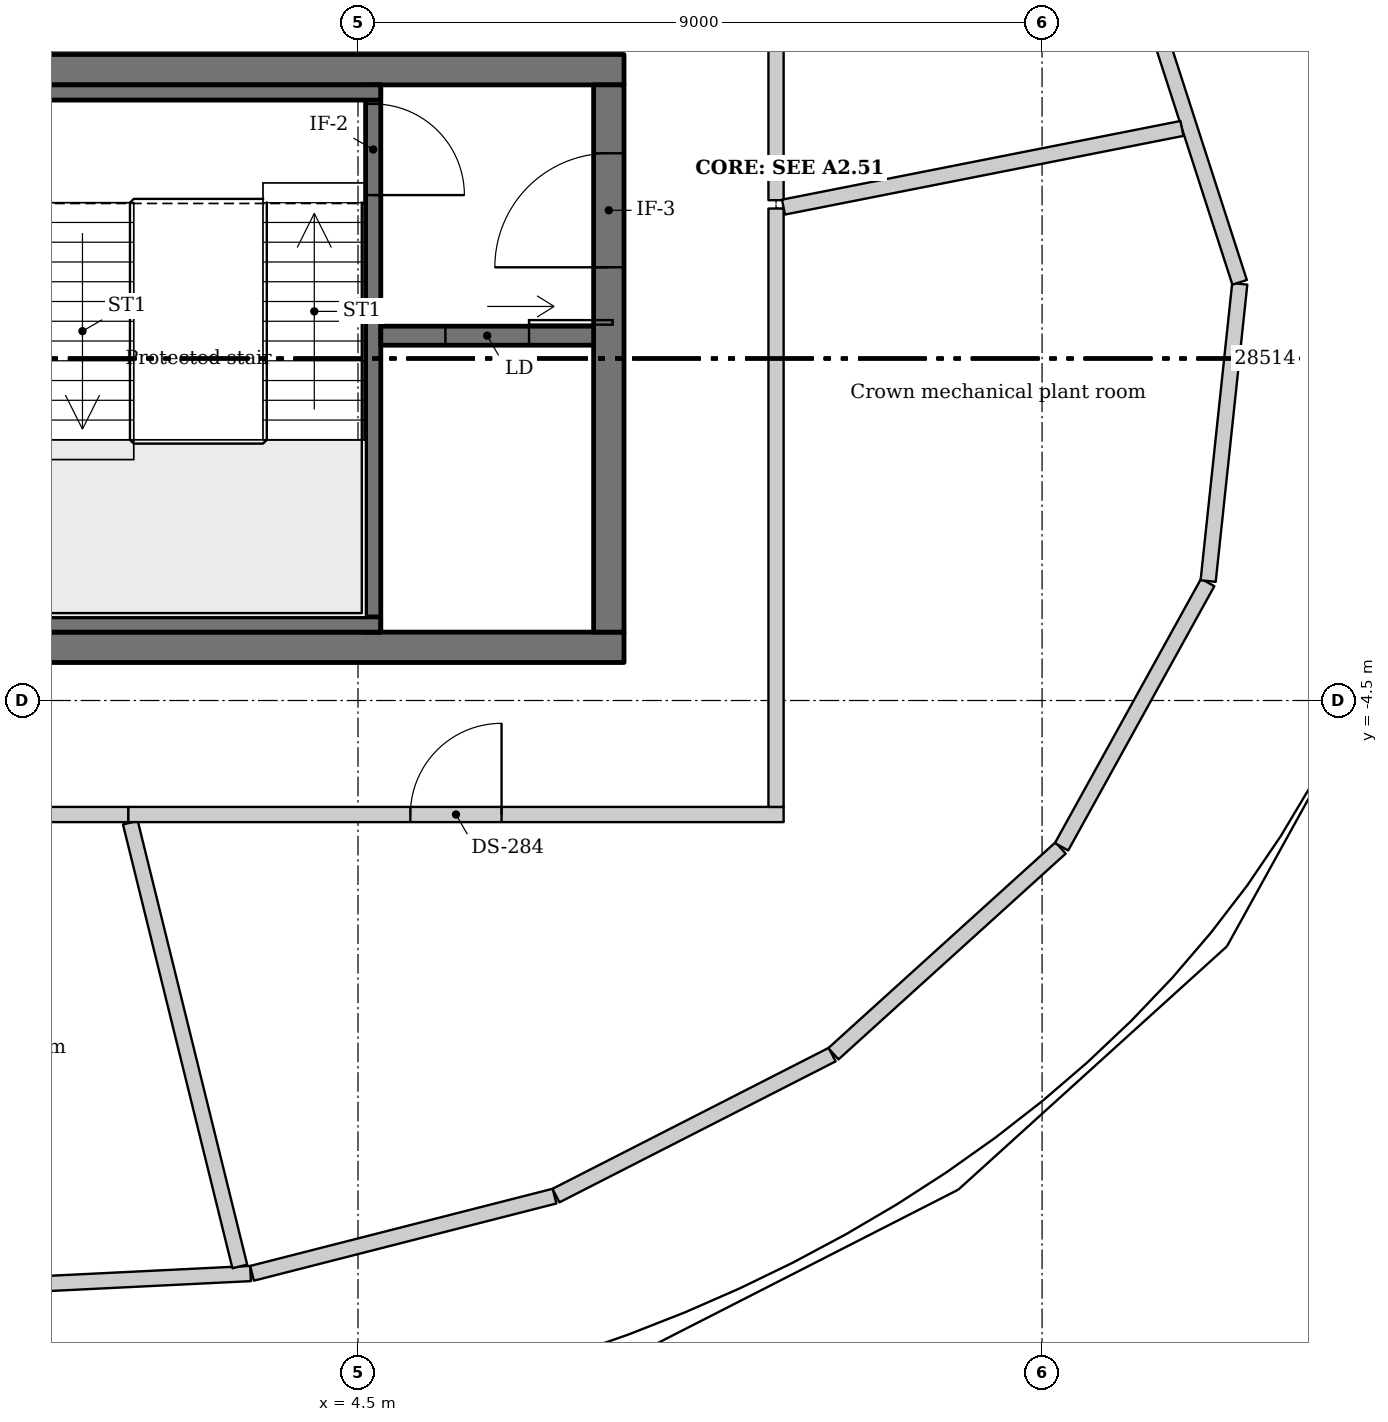
"""IFC4 building model, lengths in metres.
Left out: names, types, materials, properties, quantities, classifications, styles, units other than length and angle.
Written with IfcOpenShell. Run it as: python <this file> out.ifc"""

import sys

from ifc_helpers import new_model, si_unit, direction, frame, frame_2d, origin, place, context, subcontext, project, spatial, rectangle, extrude, source, transform, mapped, element, fill, save


model = new_model("IFC4")
c1 = context("Model", 3, precision=1e-05, world=origin(), true_north=direction((0.0, 1.0)))
c2 = subcontext(c1, "Body", "Model", "MODEL_VIEW")
j1 = project(units=[si_unit("LENGTHUNIT", "METRE"), si_unit("PLANEANGLEUNIT", "RADIAN")], contexts=[c1])
p1 = place(None, origin())
s1 = spatial("IfcSite", under=j1, at=p1, CompositionType="ELEMENT")
p2 = place(p1, origin())
s2 = spatial("IfcBuilding", under=s1, at=p2, CompositionType="ELEMENT")
p3 = place(p2, frame((0.0, 0.0, 356.5)))
s3 = spatial("IfcBuildingStorey", under=s2, at=p3, CompositionType="ELEMENT", Elevation=356.5)
m1 = source(origin(), c2, "Body", "SweptSolid", [
    extrude(rectangle(XDim=16.0, YDim=0.4, at=frame_2d((8.0, 0.0))), origin(), (0.0, 0.0, 1.0), 4.25),
])
for number, where, z_axis, x_axis in (
    (1, (-8.0, 3.8, 0.0), (0.0, 0.0, 1.0), (1.0, 0.0, 0.0)),
    (2, (-8.0, -3.8, 0.0), (0.0, 0.0, 1.0), (1.0, 0.0, 0.0)),
):
    element("IfcWall", number, at=place(p3, frame(where, z_axis=z_axis, x_axis=x_axis)), inside=s3, PredefinedType="SHEAR", context=c2, shape_type="MappedRepresentation", body=[
        mapped(m1, transform((0.0, 0.0, 0.0))),
    ])
m2 = source(origin(), c2, "Body", "SweptSolid", [
    extrude(rectangle(XDim=7.2, YDim=0.4, at=frame_2d((3.6, 0.0))), origin(), (0.0, 0.0, 1.0), 4.25),
])
p4 = place(p3, frame((7.8, -3.6, 0.0), z_axis=(0.0, 0.0, 1.0), x_axis=(0.0, 1.0, 0.0)))
e3 = element("IfcWall", 3, at=p4, inside=s3, PredefinedType="SHEAR", context=c2, shape_type="MappedRepresentation", body=[
    mapped(m2, transform((0.0, 0.0, 0.0))),
])
m3 = source(origin(), c2, "Body", "SweptSolid", [
    extrude(rectangle(XDim=1.5, YDim=2.1, at=frame_2d((0.75, 1.05))), frame((0.0, 0.21, 0.0), z_axis=(0.0, -1.0, 0.0), x_axis=(1.0, 0.0, 0.0)), (0.0, 0.0, 1.0), 0.42),
])
p5 = place(p4, frame((4.8, 0.0, 0.0)))
e4 = element("IfcOpeningElement", 4, at=p5, cuts=e3, PredefinedType="OPENING", context=c2, shape_type="MappedRepresentation", body=[
    mapped(m3, transform((0.0, 0.0, 0.0))),
])
m4 = source(origin(), c2, "Body", "SweptSolid", [
    extrude(rectangle(XDim=4.116, YDim=0.2, at=frame_2d((2.058, 0.0))), origin(), (0.0, 0.0, 1.0), 4.25),
])
p6 = place(p3, frame((3.086, -12.04, 0.0), z_axis=(0.0, 0.0, 1.0), x_axis=(-0.998790641863, -0.049165574616, 0.0)))
e5 = element("IfcWall", 5, at=p6, inside=s3, PredefinedType="SOLIDWALL", context=c2, shape_type="MappedRepresentation", body=[
    mapped(m4, transform((0.0, 0.0, 0.0))),
])
m5 = source(origin(), c2, "Body", "SweptSolid", [
    extrude(rectangle(XDim=4.107, YDim=0.2, at=frame_2d((2.054, 0.0))), origin(), (0.0, 0.0, 1.0), 4.25),
])
p7 = place(p3, frame((7.086, -11.021, 0.0), z_axis=(0.0, 0.0, 1.0), x_axis=(-0.96894922759, -0.247259770996, 0.0)))
e6 = element("IfcWall", 6, at=p7, inside=s3, PredefinedType="SOLIDWALL", context=c2, shape_type="MappedRepresentation", body=[
    mapped(m5, transform((0.0, 0.0, 0.0))),
])
m6 = source(origin(), c2, "Body", "SweptSolid", [
    extrude(rectangle(XDim=4.08, YDim=0.2, at=frame_2d((2.04, 0.0))), origin(), (0.0, 0.0, 1.0), 4.25),
])
p8 = place(p3, frame((10.738, -9.159, 0.0), z_axis=(0.0, 0.0, 1.0), x_axis=(-0.89066198265, -0.454666067198, 0.0)))
e7 = element("IfcWall", 7, at=p8, inside=s3, PredefinedType="SOLIDWALL", context=c2, shape_type="MappedRepresentation", body=[
    mapped(m6, transform((0.0, 0.0, 0.0))),
])
m7 = source(origin(), c2, "Body", "SweptSolid", [
    extrude(rectangle(XDim=4.033, YDim=0.2, at=frame_2d((2.017, 0.0))), origin(), (0.0, 0.0, 1.0), 4.25),
])
p9 = place(p3, frame((13.744, -6.44, 0.0), z_axis=(0.0, 0.0, 1.0), x_axis=(-0.741168574023, -0.671318959125, 0.0)))
e8 = element("IfcWall", 8, at=p9, inside=s3, PredefinedType="SOLIDWALL", context=c2, shape_type="MappedRepresentation", body=[
    mapped(m7, transform((0.0, 0.0, 0.0))),
])
m8 = source(origin(), c2, "Body", "SweptSolid", [
    extrude(rectangle(XDim=3.974, YDim=0.2, at=frame_2d((1.987, 0.0))), origin(), (0.0, 0.0, 1.0), 4.25),
])
p10 = place(p3, frame((15.679, -2.947, 0.0), z_axis=(0.0, 0.0, 1.0), x_axis=(-0.483910254113, -0.875117629787, 0.0)))
e9 = element("IfcWall", 9, at=p10, inside=s3, PredefinedType="SOLIDWALL", context=c2, shape_type="MappedRepresentation", body=[
    mapped(m8, transform((0.0, 0.0, 0.0))),
])
m9 = source(origin(), c2, "Body", "SweptSolid", [
    extrude(rectangle(XDim=3.933, YDim=0.2, at=frame_2d((1.966, 0.0))), origin(), (0.0, 0.0, 1.0), 4.25),
])
p11 = place(p3, frame((16.101, 0.983, 0.0), z_axis=(0.0, 0.0, 1.0), x_axis=(-0.10577691274, -0.994389885674, 0.0)))
e10 = element("IfcWall", 10, at=p11, inside=s3, PredefinedType="SOLIDWALL", context=c2, shape_type="MappedRepresentation", body=[
    mapped(m9, transform((0.0, 0.0, 0.0))),
])
m10 = source(origin(), c2, "Body", "SweptSolid", [
    extrude(rectangle(XDim=3.948, YDim=0.2, at=frame_2d((1.974, 0.0))), origin(), (0.0, 0.0, 1.0), 4.25),
])
p12 = place(p3, frame((14.885, 4.76, 0.0), z_axis=(0.0, 0.0, 1.0), x_axis=(0.307365880997, -0.951591411898, 0.0)))
e11 = element("IfcWall", 11, at=p12, inside=s3, PredefinedType="SOLIDWALL", context=c2, shape_type="MappedRepresentation", body=[
    mapped(m10, transform((0.0, 0.0, 0.0))),
])
m11 = source(origin(), c2, "Body", "SweptSolid", [
    extrude(rectangle(XDim=7.2, YDim=0.2, at=frame_2d((3.6, 0.0))), origin(), (0.0, 0.0, 1.0), 4.25),
])
p13 = place(p3, frame((4.7, -3.6, 0.0), z_axis=(0.0, 0.0, 1.0), x_axis=(0.0, 1.0, 0.0)))
e12 = element("IfcWall", 12, at=p13, inside=s3, PredefinedType="SHEAR", context=c2, shape_type="MappedRepresentation", body=[
    mapped(m11, transform((0.0, 0.0, 0.0))),
])
m12 = source(origin(), c2, "Body", "SweptSolid", [
    extrude(rectangle(XDim=1.2, YDim=2.1, at=frame_2d((0.6, 1.05))), frame((0.0, 0.11, 0.0), z_axis=(0.0, -1.0, 0.0), x_axis=(1.0, 0.0, 0.0)), (0.0, 0.0, 1.0), 0.22),
])
p14 = place(p13, frame((5.75, 0.0, 0.0)))
e13 = element("IfcOpeningElement", 13, at=p14, cuts=e12, PredefinedType="OPENING", context=c2, shape_type="MappedRepresentation", body=[
    mapped(m12, transform((0.0, 0.0, 0.0))),
])
m13 = source(origin(), c2, "Body", "SweptSolid", [
    extrude(rectangle(XDim=2.8, YDim=0.25, at=frame_2d((1.4, 0.0))), origin(), (0.0, 0.0, 1.0), 4.25),
])
p15 = place(p3, frame((7.6, 0.3, 0.0), z_axis=(0.0, 0.0, 1.0), x_axis=(-1.0, 0.0, 0.0)))
e14 = element("IfcWall", 14, at=p15, inside=s3, PredefinedType="SHEAR", context=c2, shape_type="MappedRepresentation", body=[
    mapped(m13, transform((0.0, 0.0, 0.0))),
])
m14 = source(origin(), c2, "Body", "SweptSolid", [
    extrude(rectangle(XDim=1.1, YDim=2.1, at=frame_2d((0.55, 1.05))), frame((0.0, 0.135, 0.0), z_axis=(0.0, -1.0, 0.0), x_axis=(1.0, 0.0, 0.0)), (0.0, 0.0, 1.0), 0.27),
])
p16 = place(p15, frame((0.85, 0.0, 0.0)))
e15 = element("IfcOpeningElement", 15, at=p16, cuts=e14, PredefinedType="OPENING", context=c2, shape_type="MappedRepresentation", body=[
    mapped(m14, transform((0.0, 0.0, 0.0))),
])
m15 = source(origin(), c2, "Body", "SweptSolid", [
    extrude(rectangle(XDim=9.596, YDim=0.2, at=frame_2d((4.798, 0.0))), origin(), (0.0, 0.0, 1.0), 4.25),
])
for number, where, z_axis, x_axis in (
    (16, (-4.798, -3.5, 0.0), (0.0, 0.0, 1.0), (1.0, 0.0, 0.0)),
    (17, (4.798, 3.5, 0.0), (0.0, 0.0, 1.0), (-1.0, 0.0, 0.0)),
):
    element("IfcWall", number, at=place(p3, frame(where, z_axis=z_axis, x_axis=x_axis)), inside=s3, PredefinedType="SHEAR", context=c2, shape_type="MappedRepresentation", body=[
        mapped(m15, transform((0.0, 0.0, 0.0))),
    ])
m16 = source(origin(), c2, "Body", "SweptSolid", [
    extrude(rectangle(XDim=11.579, YDim=0.2, at=frame_2d((5.79, 0.0))), origin(), (0.0, 0.0, 1.0), 4.25),
])
p17 = place(p3, frame((1.479, -6.0, 0.0), z_axis=(0.0, 0.0, 1.0), x_axis=(-1.0, 0.0, 0.0)))
e18 = element("IfcWall", 18, at=p17, inside=s3, PredefinedType="PARTITIONING", context=c2, shape_type="MappedRepresentation", body=[
    mapped(m16, transform((0.0, 0.0, 0.0))),
])
p18 = place(p17, frame((5.189, 0.0, 0.0)))
e19 = element("IfcOpeningElement", 19, at=p18, cuts=e18, PredefinedType="OPENING", context=c2, shape_type="MappedRepresentation", body=[
    mapped(m12, transform((0.0, 0.0, 0.0))),
])
m17 = source(origin(), c2, "Body", "SweptSolid", [
    extrude(rectangle(XDim=6.014, YDim=0.2, at=frame_2d((3.007, 0.0))), origin(), (0.0, 0.0, 1.0), 4.25),
])
p19 = place(p3, frame((1.505, -6.107, 0.0), z_axis=(0.0, 0.0, 1.0), x_axis=(0.239468317603, -0.970904179033, 0.0)))
e20 = element("IfcWall", 20, at=p19, inside=s3, PredefinedType="PARTITIONING", context=c2, shape_type="MappedRepresentation", body=[
    mapped(m17, transform((0.0, 0.0, 0.0))),
])
m18 = source(origin(), c2, "Body", "SweptSolid", [
    extrude(rectangle(XDim=8.621, YDim=0.2, at=frame_2d((4.311, 0.0))), origin(), (0.0, 0.0, 1.0), 4.25),
])
p20 = place(p3, frame((10.1, -6.0, 0.0), z_axis=(0.0, 0.0, 1.0), x_axis=(-1.0, 0.0, 0.0)))
e21 = element("IfcWall", 21, at=p20, inside=s3, PredefinedType="PARTITIONING", context=c2, shape_type="MappedRepresentation", body=[
    mapped(m18, transform((0.0, 0.0, 0.0))),
])
p21 = place(p20, frame((3.711, 0.0, 0.0)))
e22 = element("IfcOpeningElement", 22, at=p21, cuts=e21, PredefinedType="OPENING", context=c2, shape_type="MappedRepresentation", body=[
    mapped(m12, transform((0.0, 0.0, 0.0))),
])
m19 = source(origin(), c2, "Body", "SweptSolid", [
    extrude(rectangle(XDim=7.873, YDim=0.2, at=frame_2d((3.937, 0.0))), origin(), (0.0, 0.0, 1.0), 4.25),
])
p22 = place(p3, frame((10.0, 1.973, 0.0), z_axis=(0.0, 0.0, 1.0), x_axis=(0.0, -1.0, 0.0)))
e23 = element("IfcWall", 23, at=p22, inside=s3, PredefinedType="PARTITIONING", context=c2, shape_type="MappedRepresentation", body=[
    mapped(m19, transform((0.0, 0.0, 0.0))),
])
m20 = source(origin(), c2, "Body", "SweptSolid", [
    extrude(rectangle(XDim=3.817, YDim=0.2, at=frame_2d((1.908, 0.0))), origin(), (0.0, 0.0, 1.0), 4.25),
])
p23 = place(p3, frame((10.0, 5.9, 0.0), z_axis=(0.0, 0.0, 1.0), x_axis=(0.0, -1.0, 0.0)))
e24 = element("IfcWall", 24, at=p23, inside=s3, PredefinedType="PARTITIONING", context=c2, shape_type="MappedRepresentation", body=[
    mapped(m20, transform((0.0, 0.0, 0.0))),
])
m21 = source(origin(), c2, "Body", "SweptSolid", [
    extrude(rectangle(XDim=5.344, YDim=0.2, at=frame_2d((2.672, 0.0))), origin(), (0.0, 0.0, 1.0), 4.25),
])
p24 = place(p3, frame((15.34, 3.027, 0.0), z_axis=(0.0, 0.0, 1.0), x_axis=(-0.981055750952, -0.193725614011, 0.0)))
e25 = element("IfcWall", 25, at=p24, inside=s3, PredefinedType="PARTITIONING", context=c2, shape_type="MappedRepresentation", body=[
    mapped(m21, transform((0.0, 0.0, 0.0))),
])
m22 = source(origin(), c2, "Body", "SweptSolid", [
    extrude(rectangle(XDim=1.1, YDim=2.1, at=frame_2d((0.55, 1.05))), frame((0.0, 0.025, 0.0), z_axis=(0.0, -1.0, 0.0), x_axis=(1.0, 0.0, 0.0)), (0.0, 0.0, 1.0), 0.05),
])
p25 = place(p16, origin())
e26 = element("IfcDoor", 26, at=p25, inside=s3, OperationType="SLIDING_TO_LEFT", PredefinedType="DOOR", context=c2, shape_type="MappedRepresentation", body=[
    mapped(m22, transform((0.0, 0.0, 0.0))),
])
fill(e15, e26)
m23 = source(origin(), c2, "Body", "SweptSolid", [
    extrude(rectangle(XDim=1.2, YDim=2.1, at=frame_2d((0.6, 1.05))), frame((0.0, 0.025, 0.0), z_axis=(0.0, -1.0, 0.0), x_axis=(1.0, 0.0, 0.0)), (0.0, 0.0, 1.0), 0.05),
])
p26 = place(p14, origin())
e27 = element("IfcDoor", 27, at=p26, inside=s3, OperationType="SINGLE_SWING_RIGHT", PredefinedType="DOOR", context=c2, shape_type="MappedRepresentation", body=[
    mapped(m23, transform((0.0, 0.0, 0.0))),
])
fill(e13, e27)
m24 = source(origin(), c2, "Body", "SweptSolid", [
    extrude(rectangle(XDim=1.5, YDim=2.1, at=frame_2d((0.75, 1.05))), frame((0.0, 0.025, 0.0), z_axis=(0.0, -1.0, 0.0), x_axis=(1.0, 0.0, 0.0)), (0.0, 0.0, 1.0), 0.05),
])
p27 = place(p5, origin())
e28 = element("IfcDoor", 28, at=p27, inside=s3, OperationType="DOUBLE_DOOR_SINGLE_SWING", PredefinedType="DOOR", context=c2, shape_type="MappedRepresentation", body=[
    mapped(m24, transform((0.0, 0.0, 0.0))),
])
fill(e4, e28)
m25 = source(origin(), c2, "Body", "SweptSolid", [
    extrude(rectangle(XDim=1.2, YDim=2.1, at=frame_2d((0.6, 1.05))), frame((0.0, 0.025, 0.0), z_axis=(0.0, -1.0, 0.0), x_axis=(1.0, 0.0, 0.0)), (0.0, 0.0, 1.0), 0.05),
])
p28 = place(p21, origin())
e29 = element("IfcDoor", 29, at=p28, inside=s3, OperationType="SINGLE_SWING_LEFT", PredefinedType="DOOR", context=c2, shape_type="MappedRepresentation", body=[
    mapped(m25, transform((0.0, 0.0, 0.0))),
])
fill(e22, e29)
save(model, sys.argv[1])
